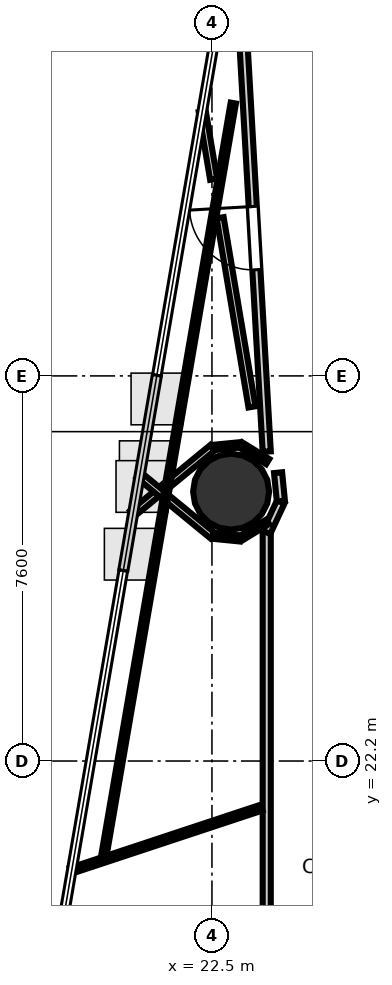
"""IFC4 building model, lengths in metres.
Left out: names, types, materials, properties, quantities, classifications, styles, units other than length and angle.
Written with IfcOpenShell. Run it as: python <this file> out.ifc"""

import sys

from ifc_helpers import new_model, si_unit, direction, frame, frame_2d, origin, origin_2d, place, context, subcontext, project, spatial, rectangle, hollow_circle, extrude, element, fill, save


model = new_model("IFC4")
c1 = context("Model", 3, precision=1e-05, world=origin(), true_north=direction((0.0, 1.0)))
c2 = subcontext(c1, "Body", "Model", "MODEL_VIEW")
j1 = project(units=[si_unit("LENGTHUNIT", "METRE"), si_unit("PLANEANGLEUNIT", "RADIAN")], contexts=[c1])
p1 = place(None, origin())
s1 = spatial("IfcSite", under=j1, at=p1, CompositionType="ELEMENT")
p2 = place(p1, origin())
s2 = spatial("IfcBuilding", under=s1, at=p2, CompositionType="ELEMENT")
p3 = place(p2, frame((0.0, 0.0, 112.6)))
s3 = spatial("IfcBuildingStorey", under=s2, at=p3, CompositionType="ELEMENT", Elevation=112.6)
p4 = place(p3, frame((22.878, 27.516, 0.0), z_axis=(0.0, 0.0, 1.0), x_axis=(1.0, 0.0, 0.0)))
e1 = element("IfcColumn", 1, at=p4, inside=s3, PredefinedType="COLUMN", context=c2, shape_type="SweptSolid", body=[
    extrude(hollow_circle(Radius=0.75, WallThickness=0.036, at=origin_2d()), origin(), (0.0, 0.0, 1.0), 3.7),
])
p5 = place(p3, frame((23.581, 28.307, 0.0), z_axis=(0.0, 0.0, 1.0), x_axis=(-0.056927299401, 0.998378326379, 0.0)))
e2 = element("IfcWall", 2, at=p5, inside=s3, PredefinedType="PARTITIONING", context=c2, shape_type="SweptSolid", body=[
    extrude(rectangle(XDim=10.615, YDim=0.16, at=frame_2d((5.307, 0.0))), origin(), (0.0, 0.0, 1.0), 2.84),
])
p6 = place(p5, frame((3.594, 0.0, 0.0)))
e3 = element("IfcOpeningElement", 3, at=p6, cuts=e2, PredefinedType="OPENING", context=c2, shape_type="SweptSolid", body=[
    extrude(rectangle(XDim=1.25, YDim=2.2, at=frame_2d((0.625, 1.1))), frame((0.0, 0.09, 0.0), z_axis=(0.0, -1.0, 0.0), x_axis=(1.0, 0.0, 0.0)), (0.0, 0.0, 1.0), 0.18),
])
p7 = place(p3, frame((23.581, 18.15, 0.0), z_axis=(0.0, 0.0, 1.0), x_axis=(0.0, 1.0, 0.0)))
e4 = element("IfcWall", 4, at=p7, inside=s3, PredefinedType="PARTITIONING", context=c2, shape_type="SweptSolid", body=[
    extrude(rectangle(XDim=8.575, YDim=0.16, at=frame_2d((4.288, 0.0))), origin(), (0.0, 0.0, 1.0), 2.84),
])
p8 = place(p3, frame((23.578, 26.712, 0.0), z_axis=(0.0, 0.0, 1.0), x_axis=(0.421251946418, 0.906943657367, 0.0)))
e5 = element("IfcWall", 5, at=p8, inside=s3, PredefinedType="PARTITIONING", context=c2, shape_type="SweptSolid", body=[
    extrude(rectangle(XDim=0.663, YDim=0.16, at=frame_2d((0.332, 0.0))), origin(), (0.0, 0.0, 1.0), 2.84),
])
p9 = place(p3, frame((23.86, 27.33, 0.0), z_axis=(0.0, 0.0, 1.0), x_axis=(-0.098000919071, 0.995186324193, 0.0)))
e6 = element("IfcWall", 6, at=p9, inside=s3, PredefinedType="PARTITIONING", context=c2, shape_type="SweptSolid", body=[
    extrude(rectangle(XDim=0.563, YDim=0.16, at=frame_2d((0.281, 0.0))), origin(), (0.0, 0.0, 1.0), 2.84),
])
p10 = place(p3, frame((19.713, 20.034, 0.0), z_axis=(0.0, 0.0, 1.0), x_axis=(0.949321292103, 0.314307308793, 0.0)))
e7 = element("IfcWall", 7, at=p10, inside=s3, PredefinedType="PARTITIONING", context=c2, shape_type="SweptSolid", body=[
    extrude(rectangle(XDim=3.968, YDim=0.12, at=frame_2d((1.984, 0.0))), origin(), (0.0, 0.0, 1.0), 2.84),
])
p11 = place(p3, frame((23.6, 28.11, 0.0), z_axis=(0.0, 0.0, 1.0), x_axis=(-0.851712341449, 0.524009625316, 0.0)))
e8 = element("IfcWall", 8, at=p11, inside=s3, PredefinedType="PARTITIONING", context=c2, shape_type="SweptSolid", body=[
    extrude(rectangle(XDim=0.621, YDim=0.12, at=frame_2d((0.31, 0.0))), origin(), (0.0, 0.0, 1.0), 2.84),
])
p12 = place(p3, frame((23.052, 28.439, 0.0), z_axis=(0.0, 0.0, 1.0), x_axis=(-0.995191506225, -0.09794828195, 0.0)))
e9 = element("IfcWall", 9, at=p12, inside=s3, PredefinedType="PARTITIONING", context=c2, shape_type="SweptSolid", body=[
    extrude(rectangle(XDim=0.528, YDim=0.105, at=frame_2d((0.264, 0.0))), origin(), (0.0, 0.0, 1.0), 2.84),
])
p13 = place(p3, frame((22.51, 28.381, 0.0), z_axis=(0.0, 0.0, 1.0), x_axis=(-0.772998253564, -0.63440814937, 0.0)))
e10 = element("IfcWall", 10, at=p13, inside=s3, PredefinedType="PARTITIONING", context=c2, shape_type="SweptSolid", body=[
    extrude(rectangle(XDim=2.043, YDim=0.14, at=frame_2d((1.022, 0.0))), origin(), (0.0, 0.0, 1.0), 2.095),
])
p14 = place(p3, frame((21.057, 27.844, 0.0), z_axis=(0.0, 0.0, 1.0), x_axis=(0.772990083311, -0.634418104331, 0.0)))
e11 = element("IfcWall", 11, at=p14, inside=s3, PredefinedType="PARTITIONING", context=c2, shape_type="SweptSolid", body=[
    extrude(rectangle(XDim=1.88, YDim=0.14, at=frame_2d((0.94, 0.0))), origin(), (0.0, 0.0, 1.0), 2.095),
])
p15 = place(p3, frame((22.527, 26.644, 0.0), z_axis=(0.0, 0.0, 1.0), x_axis=(0.995191506225, -0.09794828195, 0.0)))
e12 = element("IfcWall", 12, at=p15, inside=s3, PredefinedType="PARTITIONING", context=c2, shape_type="SweptSolid", body=[
    extrude(rectangle(XDim=0.528, YDim=0.12, at=frame_2d((0.264, 0.0))), origin(), (0.0, 0.0, 1.0), 2.84),
])
p16 = place(p3, frame((23.072, 26.597, 0.0), z_axis=(0.0, 0.0, 1.0), x_axis=(0.851536753009, 0.524294915363, 0.0)))
e13 = element("IfcWall", 13, at=p16, inside=s3, PredefinedType="PARTITIONING", context=c2, shape_type="SweptSolid", body=[
    extrude(rectangle(XDim=0.621, YDim=0.105, at=frame_2d((0.31, 0.0))), origin(), (0.0, 0.0, 1.0), 2.84),
])
p17 = place(p3, frame((20.371, 20.358, 0.0), z_axis=(0.0, 0.0, 1.0), x_axis=(0.169525939527, 0.985525725604, 0.0)))
e14 = element("IfcWall", 14, at=p17, inside=s3, PredefinedType="PARTITIONING", context=c2, shape_type="SweptSolid", body=[
    extrude(rectangle(XDim=15.044, YDim=0.105, at=frame_2d((7.522, 0.0))), origin(), (0.0, 0.0, 1.0), 2.095),
])
p18 = place(p3, frame((22.662, 32.921, 0.0), z_axis=(0.0, 0.0, 1.0), x_axis=(0.166124935367, -0.98610471343, 0.0)))
e15 = element("IfcWall", 15, at=p18, inside=s3, PredefinedType="PARTITIONING", context=c2, shape_type="SweptSolid", body=[
    extrude(rectangle(XDim=3.784, YDim=0.14, at=frame_2d((1.892, 0.0))), origin(), (0.0, 0.0, 1.0), 2.84),
])
p19 = place(p3, frame((22.308, 35.017, 0.0), z_axis=(0.0, 0.0, 1.0), x_axis=(0.166093075261, -0.98611008024, 0.0)))
e16 = element("IfcWall", 16, at=p19, inside=s3, PredefinedType="PARTITIONING", context=c2, shape_type="SweptSolid", body=[
    extrude(rectangle(XDim=1.355, YDim=0.14, at=frame_2d((0.678, 0.0))), origin(), (0.0, 0.0, 1.0), 2.84),
])
p20 = place(p6, origin())
e17 = element("IfcDoor", 17, at=p20, inside=s3, OperationType="SINGLE_SWING_RIGHT", PredefinedType="DOOR", context=c2, shape_type="SweptSolid", body=[
    extrude(rectangle(XDim=1.25, YDim=2.2, at=frame_2d((0.625, 1.1))), frame((0.0, 0.025, 0.0), z_axis=(0.0, -1.0, 0.0), x_axis=(1.0, 0.0, 0.0)), (0.0, 0.0, 1.0), 0.05),
])
fill(e3, e17)
save(model, sys.argv[1])
